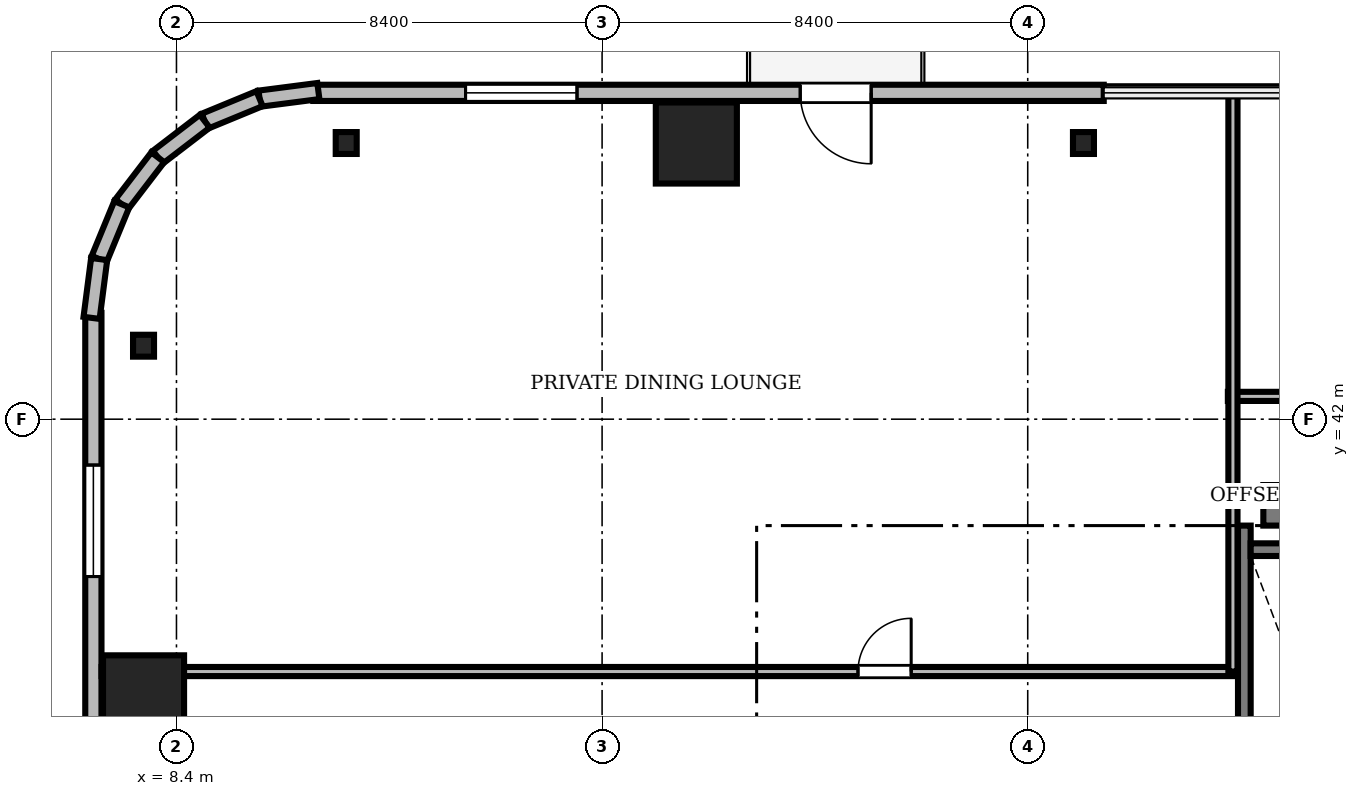
"""IFC4 building model, lengths in metres.
Left out: names, types, materials, properties, quantities, classifications, styles, units other than length and angle.
Written with IfcOpenShell. Run it as: python <this file> out.ifc"""

import sys

from ifc_helpers import new_model, si_unit, direction, frame, frame_2d, origin, origin_2d, place, context, subcontext, project, spatial, rectangle, i_section, extrude, source, transform, mapped, element, fill, save


model = new_model("IFC4")
c1 = context("Model", 3, precision=1e-05, world=origin(), true_north=direction((0.0, 1.0)))
c2 = subcontext(c1, "Body", "Model", "MODEL_VIEW")
j1 = project(units=[si_unit("LENGTHUNIT", "METRE"), si_unit("PLANEANGLEUNIT", "RADIAN")], contexts=[c1])
p1 = place(None, origin())
s1 = spatial("IfcSite", under=j1, at=p1, CompositionType="ELEMENT")
p2 = place(p1, origin())
s2 = spatial("IfcBuilding", under=s1, at=p2, CompositionType="ELEMENT")
p3 = place(p2, frame((0.0, 0.0, 144.6)))
s3 = spatial("IfcBuildingStorey", under=s2, at=p3, CompositionType="ELEMENT", Elevation=144.6)
m1 = source(origin(), c2, "Body", "SweptSolid", [
    extrude(rectangle(XDim=17.52, YDim=0.8, at=frame_2d((8.76, 0.0))), origin(), (0.0, 0.0, 1.0), 3.46),
])
p4 = place(p3, frame((29.85, 40.3, 0.0), z_axis=(0.0, 0.0, 1.0), x_axis=(1.0, 0.0, 0.0)))
e1 = element("IfcWall", 1, at=p4, inside=s3, PredefinedType="SHEAR", context=c2, shape_type="MappedRepresentation", body=[
    mapped(m1, transform((0.0, 0.0, 0.0), scale=1.0)),
])
m2 = source(origin(), c2, "Body", "SweptSolid", [
    extrude(rectangle(XDim=1.6, YDim=1.6, at=origin_2d()), origin(), (0.0, 0.0, 1.0), 3.46),
])
for number, where, z_axis, x_axis in (
    (2, (18.66, 47.45, 0.0), (0.0, 0.0, 1.0), (1.0, 0.0, 0.0)),
    (3, (7.75, 36.54, 0.0), (0.0, 0.0, 1.0), (1.0, 0.0, 0.0)),
):
    element("IfcColumn", number, at=place(p3, frame(where, z_axis=z_axis, x_axis=x_axis)), inside=s3, PredefinedType="COLUMN", context=c2, shape_type="MappedRepresentation", body=[
        mapped(m2, transform((0.0, 0.0, 0.0), scale=1.0)),
    ])
m3 = source(origin(), c2, "Body", "SweptSolid", [
    extrude(i_section(OverallWidth=0.414, OverallDepth=0.432, WebThickness=0.026, FlangeThickness=0.04, FilletRadius=0.015, at=origin_2d()), origin(), (0.0, 0.0, 1.0), 3.46),
])
for number, where, z_axis, x_axis in (
    (4, (26.3, 47.45, 0.0), (0.0, 0.0, 1.0), (1.0, 0.0, 0.0)),
    (5, (11.75, 47.45, 0.0), (0.0, 0.0, 1.0), (1.0, 0.0, 0.0)),
    (6, (7.75, 43.45, 0.0), (0.0, 0.0, 1.0), (1.0, 0.0, 0.0)),
):
    element("IfcColumn", number, at=place(p3, frame(where, z_axis=z_axis, x_axis=x_axis)), inside=s3, PredefinedType="COLUMN", context=c2, shape_type="MappedRepresentation", body=[
        mapped(m3, transform((0.0, 0.0, 0.0), scale=1.0)),
    ])
m4 = source(origin(), c2, "Body", "SweptSolid", [
    extrude(rectangle(XDim=15.6, YDim=0.32, at=frame_2d((7.8, 0.0))), origin(), (0.0, 0.0, 1.0), 3.46),
])
p5 = place(p3, frame((26.7, 48.44, 0.0), z_axis=(0.0, 0.0, 1.0), x_axis=(-1.0, 0.0, 0.0)))
e7 = element("IfcWall", 7, at=p5, inside=s3, PredefinedType="SOLIDWALL", context=c2, shape_type="MappedRepresentation", body=[
    mapped(m4, transform((0.0, 0.0, 0.0), scale=1.0)),
])
m5 = source(origin(), c2, "Body", "SweptSolid", [
    extrude(rectangle(XDim=1.4, YDim=2.3, at=frame_2d((0.7, 1.15))), frame((0.0, 0.17, 0.0), z_axis=(0.0, -1.0, 0.0), x_axis=(1.0, 0.0, 0.0)), (0.0, 0.0, 1.0), 0.34),
])
p6 = place(p5, frame((4.59, 0.0, 0.0)))
e8 = element("IfcOpeningElement", 8, at=p6, cuts=e7, PredefinedType="OPENING", context=c2, shape_type="MappedRepresentation", body=[
    mapped(m5, transform((0.0, 0.0, 0.0), scale=1.0)),
])
m6 = source(origin(), c2, "Body", "SweptSolid", [
    extrude(rectangle(XDim=2.2, YDim=2.4, at=frame_2d((1.1, 1.2))), frame((0.0, 0.17, 0.0), z_axis=(0.0, -1.0, 0.0), x_axis=(1.0, 0.0, 0.0)), (0.0, 0.0, 1.0), 0.34),
])
p7 = place(p5, frame((10.395, 0.0, 0.72)))
e9 = element("IfcOpeningElement", 9, at=p7, cuts=e7, PredefinedType="OPENING", context=c2, shape_type="MappedRepresentation", body=[
    mapped(m6, transform((0.0, 0.0, 0.0), scale=1.0)),
])
m7 = source(origin(), c2, "Body", "SweptSolid", [
    extrude(rectangle(XDim=15.6, YDim=0.32, at=frame_2d((7.8, 0.0))), origin(), (0.0, 0.0, 1.0), 3.46),
])
p8 = place(p3, frame((6.76, 44.1, 0.0), z_axis=(0.0, 0.0, 1.0), x_axis=(0.0, -1.0, 0.0)))
e10 = element("IfcWall", 10, at=p8, inside=s3, PredefinedType="SOLIDWALL", context=c2, shape_type="MappedRepresentation", body=[
    mapped(m7, transform((0.0, 0.0, 0.0), scale=1.0)),
])
p9 = place(p8, frame((3.005, 0.0, 0.72)))
e11 = element("IfcOpeningElement", 11, at=p9, cuts=e10, PredefinedType="OPENING", context=c2, shape_type="MappedRepresentation", body=[
    mapped(m6, transform((0.0, 0.0, 0.0), scale=1.0)),
])
m8 = source(origin(), c2, "Body", "SweptSolid", [
    extrude(rectangle(XDim=1.17, YDim=0.32, at=frame_2d((0.585, 0.0))), origin(), (0.0, 0.0, 1.0), 3.46),
])
p10 = place(p3, frame((11.2, 48.476, 0.0), z_axis=(0.0, 0.0, 1.0), x_axis=(-0.991735963317, -0.128295670475, 0.0)))
e12 = element("IfcWall", 12, at=p10, inside=s3, PredefinedType="SOLIDWALL", context=c2, shape_type="MappedRepresentation", body=[
    mapped(m8, transform((0.0, 0.0, 0.0), scale=1.0)),
])
m9 = source(origin(), c2, "Body", "SweptSolid", [
    extrude(rectangle(XDim=1.169, YDim=0.32, at=frame_2d((0.584, 0.0))), origin(), (0.0, 0.0, 1.0), 3.46),
])
p11 = place(p3, frame((10.04, 48.325, 0.0), z_axis=(0.0, 0.0, 1.0), x_axis=(-0.924552646638, -0.381054331552, 0.0)))
e13 = element("IfcWall", 13, at=p11, inside=s3, PredefinedType="SOLIDWALL", context=c2, shape_type="MappedRepresentation", body=[
    mapped(m9, transform((0.0, 0.0, 0.0), scale=1.0)),
])
m10 = source(origin(), c2, "Body", "SweptSolid", [
    extrude(rectangle(XDim=1.169, YDim=0.32, at=frame_2d((0.584, 0.0))), origin(), (0.0, 0.0, 1.0), 3.46),
])
p12 = place(p3, frame((8.959, 47.88, 0.0), z_axis=(0.0, 0.0, 1.0), x_axis=(-0.793663520347, -0.608356981114, 0.0)))
e14 = element("IfcWall", 14, at=p12, inside=s3, PredefinedType="SOLIDWALL", context=c2, shape_type="MappedRepresentation", body=[
    mapped(m10, transform((0.0, 0.0, 0.0), scale=1.0)),
])
m11 = source(origin(), c2, "Body", "SweptSolid", [
    extrude(rectangle(XDim=1.169, YDim=0.32, at=frame_2d((0.584, 0.0))), origin(), (0.0, 0.0, 1.0), 3.46),
])
p13 = place(p3, frame((8.031, 47.169, 0.0), z_axis=(0.0, 0.0, 1.0), x_axis=(-0.608387696831, -0.793639975269, 0.0)))
e15 = element("IfcWall", 15, at=p13, inside=s3, PredefinedType="SOLIDWALL", context=c2, shape_type="MappedRepresentation", body=[
    mapped(m11, transform((0.0, 0.0, 0.0), scale=1.0)),
])
p14 = place(p3, frame((7.32, 46.241, 0.0), z_axis=(0.0, 0.0, 1.0), x_axis=(-0.381054331552, -0.924552646638, 0.0)))
e16 = element("IfcWall", 16, at=p14, inside=s3, PredefinedType="SOLIDWALL", context=c2, shape_type="MappedRepresentation", body=[
    mapped(m9, transform((0.0, 0.0, 0.0), scale=1.0)),
])
p15 = place(p3, frame((6.875, 45.16, 0.0), z_axis=(0.0, 0.0, 1.0), x_axis=(-0.128295670475, -0.991735963317, 0.0)))
e17 = element("IfcWall", 17, at=p15, inside=s3, PredefinedType="SOLIDWALL", context=c2, shape_type="MappedRepresentation", body=[
    mapped(m8, transform((0.0, 0.0, 0.0), scale=1.0)),
])
m12 = source(origin(), c2, "Body", "SweptSolid", [
    extrude(rectangle(XDim=9.25, YDim=0.25, at=frame_2d((4.625, 0.0))), origin(), (0.0, 0.0, 1.0), 3.5),
])
p16 = place(p3, frame((29.475, 30.65, 0.0), z_axis=(0.0, 0.0, 1.0), x_axis=(0.0, 1.0, 0.0)))
e18 = element("IfcWall", 18, at=p16, inside=s3, PredefinedType="SOLIDWALL", context=c2, shape_type="MappedRepresentation", body=[
    mapped(m12, transform((0.0, 0.0, 0.0), scale=1.0)),
])
m13 = source(origin(), c2, "Body", "SweptSolid", [
    extrude(rectangle(XDim=3.15, YDim=0.25, at=frame_2d((1.575, 0.0))), origin(), (0.0, 0.0, 1.0), 3.5),
])
p17 = place(p3, frame((29.6, 39.425, 0.0), z_axis=(0.0, 0.0, 1.0), x_axis=(1.0, 0.0, 0.0)))
e19 = element("IfcWall", 19, at=p17, inside=s3, PredefinedType="SOLIDWALL", context=c2, shape_type="MappedRepresentation", body=[
    mapped(m13, transform((0.0, 0.0, 0.0), scale=1.0)),
])
m14 = source(origin(), c2, "Body", "SweptSolid", [
    extrude(rectangle(XDim=23.928, YDim=0.18, at=frame_2d((11.964, 0.0))), origin(), (0.0, 0.0, 1.0), 2.702),
])
p18 = place(p3, frame((29.15, 42.45, 0.0), z_axis=(0.0, 0.0, 1.0), x_axis=(1.0, 0.0, 0.0)))
e20 = element("IfcWall", 20, at=p18, inside=s3, PredefinedType="PARTITIONING", context=c2, shape_type="MappedRepresentation", body=[
    mapped(m14, transform((0.0, 0.0, 0.0), scale=1.0)),
])
m15 = source(origin(), c2, "Body", "SweptSolid", [
    extrude(rectangle(XDim=1.05, YDim=2.2, at=frame_2d((0.525, 1.1))), frame((0.0, 0.1, 0.0), z_axis=(0.0, -1.0, 0.0), x_axis=(1.0, 0.0, 0.0)), (0.0, 0.0, 1.0), 0.2),
])
p19 = place(p18, frame((4.5, 0.0, 0.0)))
e21 = element("IfcOpeningElement", 21, at=p19, cuts=e20, PredefinedType="OPENING", context=c2, shape_type="MappedRepresentation", body=[
    mapped(m15, transform((0.0, 0.0, 0.0), scale=1.0)),
])
m16 = source(origin(), c2, "Body", "SweptSolid", [
    extrude(rectangle(XDim=22.328, YDim=0.18, at=frame_2d((11.164, 0.0))), origin(), (0.0, 0.0, 1.0), 2.702),
])
p20 = place(p3, frame((6.922, 37.02, 0.0), z_axis=(0.0, 0.0, 1.0), x_axis=(1.0, 0.0, 0.0)))
e22 = element("IfcWall", 22, at=p20, inside=s3, PredefinedType="PARTITIONING", context=c2, shape_type="MappedRepresentation", body=[
    mapped(m16, transform((0.0, 0.0, 0.0), scale=1.0)),
])
p21 = place(p20, frame((14.928, 0.0, 0.0)))
e23 = element("IfcOpeningElement", 23, at=p21, cuts=e22, PredefinedType="OPENING", context=c2, shape_type="MappedRepresentation", body=[
    mapped(m15, transform((0.0, 0.0, 0.0), scale=1.0)),
])
m17 = source(origin(), c2, "Body", "SweptSolid", [
    extrude(rectangle(XDim=11.45, YDim=0.18, at=frame_2d((5.725, 0.0))), origin(), (0.0, 0.0, 1.0), 2.702),
])
p22 = place(p3, frame((29.25, 37.02, 0.0), z_axis=(0.0, 0.0, 1.0), x_axis=(0.0, 1.0, 0.0)))
e24 = element("IfcWall", 24, at=p22, inside=s3, PredefinedType="PARTITIONING", context=c2, shape_type="MappedRepresentation", body=[
    mapped(m17, transform((0.0, 0.0, 0.0), scale=1.0)),
])
m18 = source(origin(), c2, "Body", "SweptSolid", [
    extrude(rectangle(XDim=1.4, YDim=2.3, at=frame_2d((0.7, 1.15))), frame((0.0, 0.025, 0.0), z_axis=(0.0, -1.0, 0.0), x_axis=(1.0, 0.0, 0.0)), (0.0, 0.0, 1.0), 0.05),
])
p23 = place(p6, frame((1.4, 0.0, 0.0), z_axis=(0.0, 0.0, 1.0), x_axis=(-1.0, 0.0, 0.0)))
e25 = element("IfcDoor", 25, at=p23, inside=s3, OperationType="DOUBLE_DOOR_SLIDING", PredefinedType="DOOR", context=c2, shape_type="MappedRepresentation", body=[
    mapped(m18, transform((0.0, 0.0, 0.0), scale=1.0)),
])
fill(e8, e25)
m19 = source(origin(), c2, "Body", "SweptSolid", [
    extrude(rectangle(XDim=2.2, YDim=2.4, at=frame_2d((1.1, 1.2))), frame((0.0, 0.03, 0.0), z_axis=(0.0, -1.0, 0.0), x_axis=(1.0, 0.0, 0.0)), (0.0, 0.0, 1.0), 0.06),
])
p24 = place(p7, origin())
e26 = element("IfcWindow", 26, at=p24, inside=s3, PartitioningType="SINGLE_PANEL", PredefinedType="WINDOW", context=c2, shape_type="MappedRepresentation", body=[
    mapped(m19, transform((0.0, 0.0, 0.0), scale=1.0)),
])
fill(e9, e26)
p25 = place(p9, origin())
e27 = element("IfcWindow", 27, at=p25, inside=s3, PartitioningType="SINGLE_PANEL", PredefinedType="WINDOW", context=c2, shape_type="MappedRepresentation", body=[
    mapped(m19, transform((0.0, 0.0, 0.0), scale=1.0)),
])
fill(e11, e27)
m20 = source(origin(), c2, "Body", "SweptSolid", [
    extrude(rectangle(XDim=1.05, YDim=2.2, at=frame_2d((0.525, 1.1))), frame((0.0, 0.025, 0.0), z_axis=(0.0, -1.0, 0.0), x_axis=(1.0, 0.0, 0.0)), (0.0, 0.0, 1.0), 0.05),
])
p26 = place(p21, origin())
e28 = element("IfcDoor", 28, at=p26, inside=s3, OperationType="SINGLE_SWING_RIGHT", PredefinedType="DOOR", context=c2, shape_type="MappedRepresentation", body=[
    mapped(m20, transform((0.0, 0.0, 0.0), scale=1.0)),
])
fill(e23, e28)
save(model, sys.argv[1])
